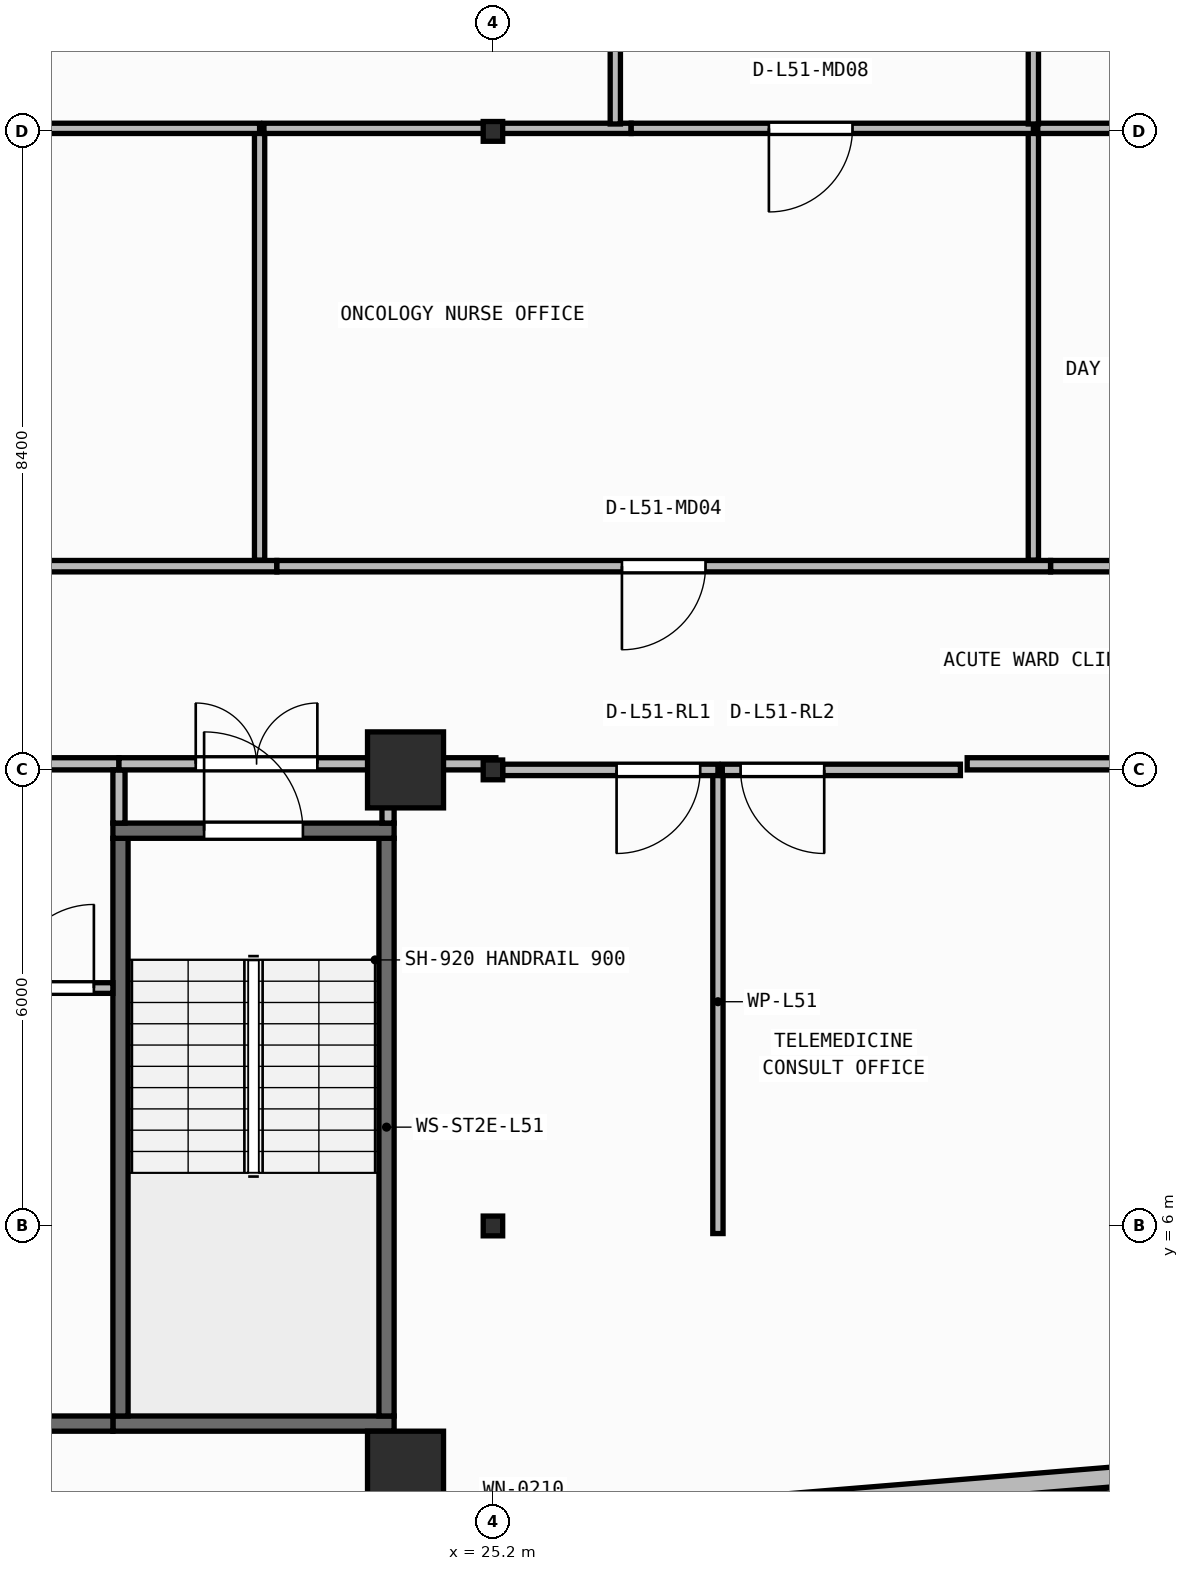
"""IFC4 building model, lengths in metres.
Left out: names, types, materials, properties, quantities, classifications, styles, units other than length and angle.
Written with IfcOpenShell. Run it as: python <this file> out.ifc"""

import sys

from ifc_helpers import new_model, si_unit, direction, frame, frame_2d, origin, origin_2d, place, context, subcontext, project, spatial, rectangle, i_section, extrude, element, fill, save


model = new_model("IFC4")
c1 = context("Model", 3, precision=1e-05, world=origin(), true_north=direction((0.0, 1.0)))
c2 = subcontext(c1, "Body", "Model", "MODEL_VIEW")
j1 = project(units=[si_unit("LENGTHUNIT", "METRE"), si_unit("PLANEANGLEUNIT", "RADIAN")], contexts=[c1])
p1 = place(None, origin())
s1 = spatial("IfcSite", under=j1, at=p1, CompositionType="ELEMENT")
p2 = place(p1, origin())
s2 = spatial("IfcBuilding", under=s1, at=p2, CompositionType="ELEMENT")
p3 = place(p2, frame((0.0, 0.0, 207.9)))
s3 = spatial("IfcBuildingStorey", under=s2, at=p3, CompositionType="ELEMENT", Elevation=207.9)
p4 = place(p3, frame((24.05, 2.8, 0.0), z_axis=(0.0, 0.0, 1.0), x_axis=(1.0, 0.0, 0.0)))
e1 = element("IfcColumn", 1, at=p4, inside=s3, PredefinedType="COLUMN", context=c2, shape_type="SweptSolid", body=[
    extrude(rectangle(XDim=1.0, YDim=1.0, at=origin_2d()), origin(), (0.0, 0.0, 1.0), 3.95),
])
p5 = place(p3, frame((25.2, 6.0, 0.0), z_axis=(0.0, 0.0, 1.0), x_axis=(1.0, 0.0, 0.0)))
e2 = element("IfcColumn", 2, at=p5, inside=s3, PredefinedType="COLUMN", context=c2, shape_type="SweptSolid", body=[
    extrude(i_section(OverallWidth=0.256, OverallDepth=0.26, WebThickness=0.01, FlangeThickness=0.017, FilletRadius=0.013, at=origin_2d()), origin(), (0.0, 0.0, 1.0), 3.95),
])
p6 = place(p3, frame((24.05, 12.0, 0.0), z_axis=(0.0, 0.0, 1.0), x_axis=(1.0, 0.0, 0.0)))
e3 = element("IfcColumn", 3, at=p6, inside=s3, PredefinedType="COLUMN", context=c2, shape_type="SweptSolid", body=[
    extrude(rectangle(XDim=1.0, YDim=1.0, at=origin_2d()), origin(), (0.0, 0.0, 1.0), 3.95),
])
for number, where, z_axis, x_axis in (
    (4, (25.2, 12.0, 0.0), (0.0, 0.0, 1.0), (1.0, 0.0, 0.0)),
    (5, (25.2, 20.4, 0.0), (0.0, 0.0, 1.0), (1.0, 0.0, 0.0)),
):
    element("IfcColumn", number, at=place(p3, frame(where, z_axis=z_axis, x_axis=x_axis)), inside=s3, PredefinedType="COLUMN", context=c2, shape_type="SweptSolid", body=[
        extrude(i_section(OverallWidth=0.256, OverallDepth=0.26, WebThickness=0.01, FlangeThickness=0.017, FilletRadius=0.013, at=origin_2d()), origin(), (0.0, 0.0, 1.0), 3.95),
    ])
p7 = place(p3, frame((2.66, 0.174, 0.0), z_axis=(0.0, 0.0, 1.0), x_axis=(0.996634028439, 0.081979347142, 0.0)))
e6 = element("IfcWall", 6, at=p7, inside=s3, PredefinedType="STANDARD", context=c2, shape_type="SweptSolid", body=[
    extrude(rectangle(XDim=46.035, YDim=0.26, at=frame_2d((23.018, 0.0))), origin(), (0.0, 0.0, 1.0), 3.71),
])
p8 = place(p7, frame((21.817, 0.0, 0.9)))
e7 = element("IfcOpeningElement", 7, at=p8, cuts=e6, PredefinedType="OPENING", context=c2, shape_type="SweptSolid", body=[
    extrude(rectangle(XDim=2.4, YDim=1.65, at=frame_2d((1.2, 0.825))), frame((0.0, 0.14, 0.0), z_axis=(0.0, -1.0, 0.0), x_axis=(1.0, 0.0, 0.0)), (0.0, 0.0, 1.0), 0.28),
])
p9 = place(p3, frame((20.2, 3.4, 0.0), z_axis=(0.0, 0.0, 1.0), x_axis=(1.0, 0.0, 0.0)))
e8 = element("IfcWall", 8, at=p9, inside=s3, PredefinedType="SHEAR", context=c2, shape_type="SweptSolid", body=[
    extrude(rectangle(XDim=3.7, YDim=0.2, at=frame_2d((1.85, 0.0))), origin(), (0.0, 0.0, 1.0), 3.71),
])
for number, where, z_axis, x_axis in (
    (9, (20.3, 3.5, 0.0), (0.0, 0.0, 1.0), (0.0, 1.0, 0.0)),
    (10, (23.8, 3.5, 0.0), (0.0, 0.0, 1.0), (0.0, 1.0, 0.0)),
):
    element("IfcWall", number, at=place(p3, frame(where, z_axis=z_axis, x_axis=x_axis)), inside=s3, PredefinedType="SHEAR", context=c2, shape_type="SweptSolid", body=[
        extrude(rectangle(XDim=7.6, YDim=0.2, at=frame_2d((3.8, 0.0))), origin(), (0.0, 0.0, 1.0), 3.71),
    ])
p10 = place(p3, frame((20.2, 11.2, 0.0), z_axis=(0.0, 0.0, 1.0), x_axis=(1.0, 0.0, 0.0)))
e11 = element("IfcWall", 11, at=p10, inside=s3, PredefinedType="SHEAR", context=c2, shape_type="SweptSolid", body=[
    extrude(rectangle(XDim=3.7, YDim=0.2, at=frame_2d((1.85, 0.0))), origin(), (0.0, 0.0, 1.0), 3.71),
])
p11 = place(p10, frame((1.2, 0.0, 0.0)))
e12 = element("IfcOpeningElement", 12, at=p11, cuts=e11, PredefinedType="OPENING", context=c2, shape_type="SweptSolid", body=[
    extrude(rectangle(XDim=1.3, YDim=2.15, at=frame_2d((0.65, 1.075))), frame((0.0, 0.11, 0.0), z_axis=(0.0, -1.0, 0.0), x_axis=(1.0, 0.0, 0.0)), (0.0, 0.0, 1.0), 0.22),
])
p12 = place(p3, frame((6.5, 3.4, 0.0), z_axis=(0.0, 0.0, 1.0), x_axis=(1.0, 0.0, 0.0)))
e13 = element("IfcWall", 13, at=p12, inside=s3, PredefinedType="SHEAR", context=c2, shape_type="SweptSolid", body=[
    extrude(rectangle(XDim=13.7, YDim=0.2, at=frame_2d((6.85, 0.0))), origin(), (0.0, 0.0, 1.0), 3.71),
])
p13 = place(p3, frame((18.61, 9.13, 0.0), z_axis=(0.0, 0.0, 1.0), x_axis=(1.0, 0.0, 0.0)))
e14 = element("IfcWall", 14, at=p13, inside=s3, PredefinedType="PARTITIONING", context=c2, shape_type="SweptSolid", body=[
    extrude(rectangle(XDim=1.59, YDim=0.14, at=frame_2d((0.795, 0.0))), origin(), (0.0, 0.0, 1.0), 3.71),
])
p14 = place(p13, frame((0.24, 0.0, 0.0)))
e15 = element("IfcOpeningElement", 15, at=p14, cuts=e14, PredefinedType="OPENING", context=c2, shape_type="SweptSolid", body=[
    extrude(rectangle(XDim=1.1, YDim=2.1, at=frame_2d((0.55, 1.05))), frame((0.0, 0.08, 0.0), z_axis=(0.0, -1.0, 0.0), x_axis=(1.0, 0.0, 0.0)), (0.0, 0.0, 1.0), 0.16),
])
p15 = place(p3, frame((12.58, 12.08, 0.0), z_axis=(0.0, 0.0, 1.0), x_axis=(1.0, 0.0, 0.0)))
e16 = element("IfcWall", 16, at=p15, inside=s3, PredefinedType="PARTITIONING", context=c2, shape_type="SweptSolid", body=[
    extrude(rectangle(XDim=7.7, YDim=0.16, at=frame_2d((3.85, 0.0))), origin(), (0.0, 0.0, 1.0), 3.152),
])
p16 = place(p15, frame((3.05, 0.0, 0.0)))
e17 = element("IfcOpeningElement", 17, at=p16, cuts=e16, PredefinedType="OPENING", context=c2, shape_type="SweptSolid", body=[
    extrude(rectangle(XDim=1.6, YDim=2.05, at=frame_2d((0.8, 1.025))), frame((0.0, 0.09, 0.0), z_axis=(0.0, -1.0, 0.0), x_axis=(1.0, 0.0, 0.0)), (0.0, 0.0, 1.0), 0.18),
])
p17 = place(p3, frame((20.28, 11.3, 0.0), z_axis=(0.0, 0.0, 1.0), x_axis=(0.0, 1.0, 0.0)))
e18 = element("IfcWall", 18, at=p17, inside=s3, PredefinedType="PARTITIONING", context=c2, shape_type="SweptSolid", body=[
    extrude(rectangle(XDim=0.7, YDim=0.16, at=frame_2d((0.35, 0.0))), origin(), (0.0, 0.0, 1.0), 3.71),
])
p18 = place(p3, frame((20.28, 12.08, 0.0), z_axis=(0.0, 0.0, 1.0), x_axis=(1.0, 0.0, 0.0)))
e19 = element("IfcWall", 19, at=p18, inside=s3, PredefinedType="PARTITIONING", context=c2, shape_type="SweptSolid", body=[
    extrude(rectangle(XDim=3.62, YDim=0.16, at=frame_2d((1.81, 0.0))), origin(), (0.0, 0.0, 1.0), 3.152),
])
p19 = place(p18, frame((1.01, 0.0, 0.0)))
e20 = element("IfcOpeningElement", 20, at=p19, cuts=e19, PredefinedType="OPENING", context=c2, shape_type="SweptSolid", body=[
    extrude(rectangle(XDim=1.6, YDim=2.05, at=frame_2d((0.8, 1.025))), frame((0.0, 0.09, 0.0), z_axis=(0.0, -1.0, 0.0), x_axis=(1.0, 0.0, 0.0)), (0.0, 0.0, 1.0), 0.18),
])
p20 = place(p3, frame((23.82, 11.3, 0.0), z_axis=(0.0, 0.0, 1.0), x_axis=(0.0, 1.0, 0.0)))
e21 = element("IfcWall", 21, at=p20, inside=s3, PredefinedType="PARTITIONING", context=c2, shape_type="SweptSolid", body=[
    extrude(rectangle(XDim=0.7, YDim=0.16, at=frame_2d((0.35, 0.0))), origin(), (0.0, 0.0, 1.0), 3.71),
])
p21 = place(p3, frame((28.16, 5.9, 0.0), z_axis=(0.0, 0.0, 1.0), x_axis=(0.0, 1.0, 0.0)))
e22 = element("IfcWall", 22, at=p21, inside=s3, PredefinedType="PARTITIONING", context=c2, shape_type="SweptSolid", body=[
    extrude(rectangle(XDim=6.1, YDim=0.135, at=frame_2d((3.05, 0.0))), origin(), (0.0, 0.0, 1.0), 3.71),
])
p22 = place(p3, frame((28.16, 12.0, 0.0), z_axis=(0.0, 0.0, 1.0), x_axis=(-1.0, 0.0, 0.0)))
e23 = element("IfcWall", 23, at=p22, inside=s3, PredefinedType="PARTITIONING", context=c2, shape_type="SweptSolid", body=[
    extrude(rectangle(XDim=2.832, YDim=0.15, at=frame_2d((1.416, 0.0))), origin(), (0.0, 0.0, 1.0), 3.152),
])
p23 = place(p22, frame((0.233, 0.0, 0.0)))
e24 = element("IfcOpeningElement", 24, at=p23, cuts=e23, PredefinedType="OPENING", context=c2, shape_type="SweptSolid", body=[
    extrude(rectangle(XDim=1.1, YDim=2.1, at=frame_2d((0.55, 1.05))), frame((0.0, 0.085, 0.0), z_axis=(0.0, -1.0, 0.0), x_axis=(1.0, 0.0, 0.0)), (0.0, 0.0, 1.0), 0.17),
])
p24 = place(p3, frame((31.35, 12.0, 0.0), z_axis=(0.0, 0.0, 1.0), x_axis=(-1.0, 0.0, 0.0)))
e25 = element("IfcWall", 25, at=p24, inside=s3, PredefinedType="PARTITIONING", context=c2, shape_type="SweptSolid", body=[
    extrude(rectangle(XDim=3.133, YDim=0.15, at=frame_2d((1.566, 0.0))), origin(), (0.0, 0.0, 1.0), 3.152),
])
p25 = place(p24, frame((1.792, 0.0, 0.0)))
e26 = element("IfcOpeningElement", 26, at=p25, cuts=e25, PredefinedType="OPENING", context=c2, shape_type="SweptSolid", body=[
    extrude(rectangle(XDim=1.1, YDim=2.1, at=frame_2d((0.55, 1.05))), frame((0.0, 0.085, 0.0), z_axis=(0.0, -1.0, 0.0), x_axis=(1.0, 0.0, 0.0)), (0.0, 0.0, 1.0), 0.17),
])
p26 = place(p3, frame((22.356, 14.68, 0.0), z_axis=(0.0, 0.0, 1.0), x_axis=(-1.0, 0.0, 0.0)))
e27 = element("IfcWall", 27, at=p26, inside=s3, PredefinedType="PARTITIONING", context=c2, shape_type="SweptSolid", body=[
    extrude(rectangle(XDim=8.802, YDim=0.15, at=frame_2d((4.401, 0.0))), origin(), (0.0, 0.0, 1.0), 3.71),
])
p27 = place(p26, frame((3.851, 0.0, 0.0)))
e28 = element("IfcOpeningElement", 28, at=p27, cuts=e27, PredefinedType="OPENING", context=c2, shape_type="SweptSolid", body=[
    extrude(rectangle(XDim=1.1, YDim=2.1, at=frame_2d((0.55, 1.05))), frame((0.0, 0.085, 0.0), z_axis=(0.0, -1.0, 0.0), x_axis=(1.0, 0.0, 0.0)), (0.0, 0.0, 1.0), 0.17),
])
p28 = place(p3, frame((32.536, 14.68, 0.0), z_axis=(0.0, 0.0, 1.0), x_axis=(-1.0, 0.0, 0.0)))
e29 = element("IfcWall", 29, at=p28, inside=s3, PredefinedType="PARTITIONING", context=c2, shape_type="SweptSolid", body=[
    extrude(rectangle(XDim=10.178, YDim=0.15, at=frame_2d((5.089, 0.0))), origin(), (0.0, 0.0, 1.0), 3.71),
])
p29 = place(p28, frame((4.539, 0.0, 0.0)))
e30 = element("IfcOpeningElement", 30, at=p29, cuts=e29, PredefinedType="OPENING", context=c2, shape_type="SweptSolid", body=[
    extrude(rectangle(XDim=1.1, YDim=2.1, at=frame_2d((0.55, 1.05))), frame((0.0, 0.085, 0.0), z_axis=(0.0, -1.0, 0.0), x_axis=(1.0, 0.0, 0.0)), (0.0, 0.0, 1.0), 0.17),
])
p30 = place(p3, frame((45.626, 14.68, 0.0), z_axis=(0.0, 0.0, 1.0), x_axis=(-1.0, 0.0, 0.0)))
e31 = element("IfcWall", 31, at=p30, inside=s3, PredefinedType="PARTITIONING", context=c2, shape_type="SweptSolid", body=[
    extrude(rectangle(XDim=13.088, YDim=0.15, at=frame_2d((6.544, 0.0))), origin(), (0.0, 0.0, 1.0), 3.71),
])
p31 = place(p30, frame((5.994, 0.0, 0.0)))
e32 = element("IfcOpeningElement", 32, at=p31, cuts=e31, PredefinedType="OPENING", context=c2, shape_type="SweptSolid", body=[
    extrude(rectangle(XDim=1.1, YDim=2.1, at=frame_2d((0.55, 1.05))), frame((0.0, 0.085, 0.0), z_axis=(0.0, -1.0, 0.0), x_axis=(1.0, 0.0, 0.0)), (0.0, 0.0, 1.0), 0.17),
])
p32 = place(p3, frame((22.13, 14.76, 0.0), z_axis=(0.0, 0.0, 1.0), x_axis=(0.0, 1.0, 0.0)))
e33 = element("IfcWall", 33, at=p32, inside=s3, PredefinedType="PARTITIONING", context=c2, shape_type="SweptSolid", body=[
    extrude(rectangle(XDim=5.68, YDim=0.135, at=frame_2d((2.84, 0.0))), origin(), (0.0, 0.0, 1.0), 3.71),
])
p33 = place(p3, frame((22.13, 20.44, 0.0), z_axis=(0.0, 0.0, 1.0), x_axis=(-1.0, 0.0, 0.0)))
e34 = element("IfcWall", 34, at=p33, inside=s3, PredefinedType="PARTITIONING", context=c2, shape_type="SweptSolid", body=[
    extrude(rectangle(XDim=8.35, YDim=0.135, at=frame_2d((4.175, 0.0))), origin(), (0.0, 0.0, 1.0), 3.152),
])
p34 = place(p3, frame((32.31, 14.76, 0.0), z_axis=(0.0, 0.0, 1.0), x_axis=(0.0, 1.0, 0.0)))
e35 = element("IfcWall", 35, at=p34, inside=s3, PredefinedType="PARTITIONING", context=c2, shape_type="SweptSolid", body=[
    extrude(rectangle(XDim=5.68, YDim=0.135, at=frame_2d((2.84, 0.0))), origin(), (0.0, 0.0, 1.0), 3.71),
])
p35 = place(p3, frame((27.018, 20.44, 0.0), z_axis=(0.0, 0.0, 1.0), x_axis=(-1.0, 0.0, 0.0)))
e36 = element("IfcWall", 36, at=p35, inside=s3, PredefinedType="PARTITIONING", context=c2, shape_type="SweptSolid", body=[
    extrude(rectangle(XDim=4.83, YDim=0.135, at=frame_2d((2.415, 0.0))), origin(), (0.0, 0.0, 1.0), 3.152),
])
p36 = place(p3, frame((32.31, 20.44, 0.0), z_axis=(0.0, 0.0, 1.0), x_axis=(-1.0, 0.0, 0.0)))
e37 = element("IfcWall", 37, at=p36, inside=s3, PredefinedType="PARTITIONING", context=c2, shape_type="SweptSolid", body=[
    extrude(rectangle(XDim=5.291, YDim=0.135, at=frame_2d((2.645, 0.0))), origin(), (0.0, 0.0, 1.0), 3.152),
])
p37 = place(p36, frame((2.379, 0.0, 0.0)))
e38 = element("IfcOpeningElement", 38, at=p37, cuts=e37, PredefinedType="OPENING", context=c2, shape_type="SweptSolid", body=[
    extrude(rectangle(XDim=1.1, YDim=2.1, at=frame_2d((0.55, 1.05))), frame((0.0, 0.077, 0.0), z_axis=(0.0, -1.0, 0.0), x_axis=(1.0, 0.0, 0.0)), (0.0, 0.0, 1.0), 0.155),
])
p38 = place(p3, frame((41.872, 20.44, 0.0), z_axis=(0.0, 0.0, 1.0), x_axis=(-1.0, 0.0, 0.0)))
e39 = element("IfcWall", 39, at=p38, inside=s3, PredefinedType="PARTITIONING", context=c2, shape_type="SweptSolid", body=[
    extrude(rectangle(XDim=9.505, YDim=0.135, at=frame_2d((4.752, 0.0))), origin(), (0.0, 0.0, 1.0), 3.152),
])
p39 = place(p38, frame((3.402, 0.0, 0.0)))
e40 = element("IfcOpeningElement", 40, at=p39, cuts=e39, PredefinedType="OPENING", context=c2, shape_type="SweptSolid", body=[
    extrude(rectangle(XDim=1.1, YDim=2.1, at=frame_2d((0.55, 1.05))), frame((0.0, 0.077, 0.0), z_axis=(0.0, -1.0, 0.0), x_axis=(1.0, 0.0, 0.0)), (0.0, 0.0, 1.0), 0.155),
])
for number, where, z_axis, x_axis in (
    (41, (26.81, 20.498, 0.0), (0.0, 0.0, 1.0), (0.0, 1.0, 0.0)),
    (42, (32.31, 20.498, 0.0), (0.0, 0.0, 1.0), (0.0, 1.0, 0.0)),
):
    element("IfcWall", number, at=place(p3, frame(where, z_axis=z_axis, x_axis=x_axis)), inside=s3, PredefinedType="PARTITIONING", context=c2, shape_type="SweptSolid", body=[
        extrude(rectangle(XDim=6.642, YDim=0.135, at=frame_2d((3.321, 0.0))), origin(), (0.0, 0.0, 1.0), 3.71),
    ])
p40 = place(p3, frame((24.02, 12.08, 0.0), z_axis=(0.0, 0.0, 1.0), x_axis=(1.0, 0.0, 0.0)))
e43 = element("IfcWall", 43, at=p40, inside=s3, PredefinedType="PARTITIONING", context=c2, shape_type="SweptSolid", body=[
    extrude(rectangle(XDim=1.219, YDim=0.16, at=frame_2d((0.609, 0.0))), origin(), (0.0, 0.0, 1.0), 3.152),
])
p41 = place(p3, frame((31.439, 12.08, 0.0), z_axis=(0.0, 0.0, 1.0), x_axis=(1.0, 0.0, 0.0)))
e44 = element("IfcWall", 44, at=p41, inside=s3, PredefinedType="PARTITIONING", context=c2, shape_type="SweptSolid", body=[
    extrude(rectangle(XDim=2.199, YDim=0.16, at=frame_2d((1.1, 0.0))), origin(), (0.0, 0.0, 1.0), 3.152),
])
p42 = place(p11, origin())
e45 = element("IfcDoor", 45, at=p42, inside=s3, OperationType="SINGLE_SWING_LEFT", PredefinedType="DOOR", context=c2, shape_type="SweptSolid", body=[
    extrude(rectangle(XDim=1.3, YDim=2.15, at=frame_2d((0.65, 1.075))), frame((0.0, 0.025, 0.0), z_axis=(0.0, -1.0, 0.0), x_axis=(1.0, 0.0, 0.0)), (0.0, 0.0, 1.0), 0.05),
])
fill(e12, e45)
p43 = place(p14, origin())
e46 = element("IfcDoor", 46, at=p43, inside=s3, OperationType="SINGLE_SWING_RIGHT", PredefinedType="DOOR", context=c2, shape_type="SweptSolid", body=[
    extrude(rectangle(XDim=1.1, YDim=2.1, at=frame_2d((0.55, 1.05))), frame((0.0, 0.025, 0.0), z_axis=(0.0, -1.0, 0.0), x_axis=(1.0, 0.0, 0.0)), (0.0, 0.0, 1.0), 0.05),
])
fill(e15, e46)
p44 = place(p19, origin())
e47 = element("IfcDoor", 47, at=p44, inside=s3, OperationType="DOUBLE_DOOR_SINGLE_SWING", PredefinedType="DOOR", context=c2, shape_type="SweptSolid", body=[
    extrude(rectangle(XDim=1.6, YDim=2.05, at=frame_2d((0.8, 1.025))), frame((0.0, 0.025, 0.0), z_axis=(0.0, -1.0, 0.0), x_axis=(1.0, 0.0, 0.0)), (0.0, 0.0, 1.0), 0.05),
])
fill(e20, e47)
p45 = place(p23, origin())
e48 = element("IfcDoor", 48, at=p45, inside=s3, OperationType="SINGLE_SWING_RIGHT", PredefinedType="DOOR", context=c2, shape_type="SweptSolid", body=[
    extrude(rectangle(XDim=1.1, YDim=2.1, at=frame_2d((0.55, 1.05))), frame((0.0, 0.025, 0.0), z_axis=(0.0, -1.0, 0.0), x_axis=(1.0, 0.0, 0.0)), (0.0, 0.0, 1.0), 0.05),
])
fill(e24, e48)
p46 = place(p25, origin())
e49 = element("IfcDoor", 49, at=p46, inside=s3, OperationType="SINGLE_SWING_LEFT", PredefinedType="DOOR", context=c2, shape_type="SweptSolid", body=[
    extrude(rectangle(XDim=1.1, YDim=2.1, at=frame_2d((0.55, 1.05))), frame((0.0, 0.025, 0.0), z_axis=(0.0, -1.0, 0.0), x_axis=(1.0, 0.0, 0.0)), (0.0, 0.0, 1.0), 0.05),
])
fill(e26, e49)
p47 = place(p29, origin())
e50 = element("IfcDoor", 50, at=p47, inside=s3, OperationType="SINGLE_SWING_RIGHT", PredefinedType="DOOR", context=c2, shape_type="SweptSolid", body=[
    extrude(rectangle(XDim=1.1, YDim=2.1, at=frame_2d((0.55, 1.05))), frame((0.0, 0.025, 0.0), z_axis=(0.0, -1.0, 0.0), x_axis=(1.0, 0.0, 0.0)), (0.0, 0.0, 1.0), 0.05),
])
fill(e30, e50)
p48 = place(p37, origin())
e51 = element("IfcDoor", 51, at=p48, inside=s3, OperationType="SINGLE_SWING_RIGHT", PredefinedType="DOOR", context=c2, shape_type="SweptSolid", body=[
    extrude(rectangle(XDim=1.1, YDim=2.1, at=frame_2d((0.55, 1.05))), frame((0.0, 0.025, 0.0), z_axis=(0.0, -1.0, 0.0), x_axis=(1.0, 0.0, 0.0)), (0.0, 0.0, 1.0), 0.05),
])
fill(e38, e51)
save(model, sys.argv[1])
